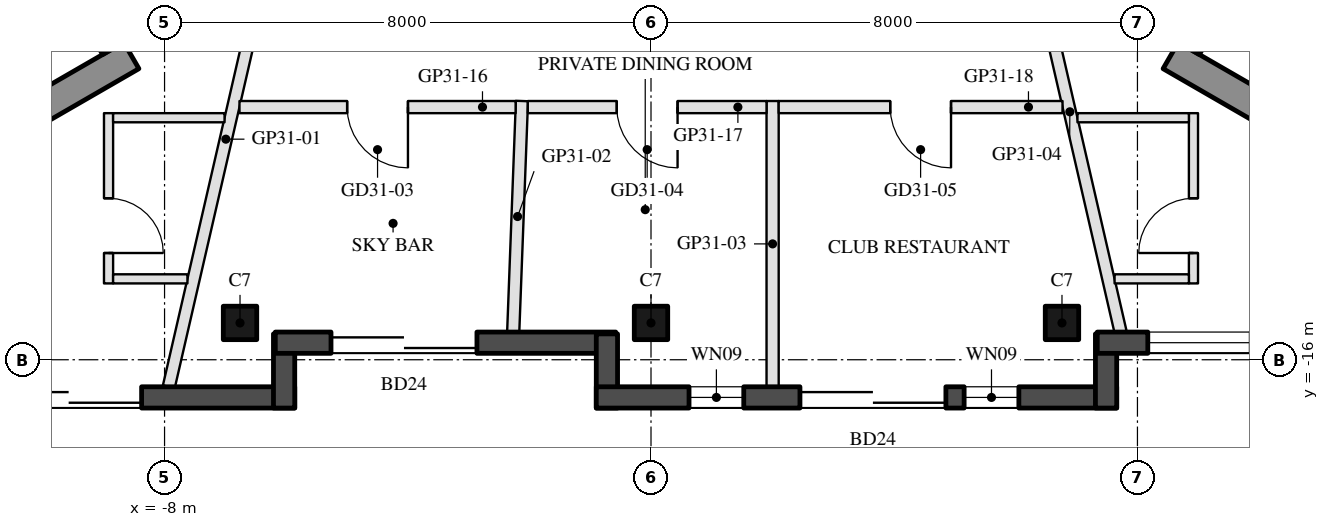
"""IFC4 building model, lengths in metres.
Left out: names, types, materials, properties, quantities, classifications, styles, units other than length and angle.
Written with IfcOpenShell. Run it as: python <this file> out.ifc"""

import sys

from ifc_helpers import new_model, si_unit, direction, frame, frame_2d, origin, origin_2d, place, context, subcontext, project, spatial, rectangle, hollow_rectangle, extrude, boolean, halfspace, element, fill, save


model = new_model("IFC4")
c1 = context("Model", 3, precision=1e-05, world=origin(), true_north=direction((0.0, 1.0)))
c2 = subcontext(c1, "Body", "Model", "MODEL_VIEW")
j1 = project(units=[si_unit("LENGTHUNIT", "METRE"), si_unit("PLANEANGLEUNIT", "RADIAN")], contexts=[c1])
p1 = place(None, origin())
s1 = spatial("IfcSite", under=j1, at=p1, CompositionType="ELEMENT")
p2 = place(p1, origin())
s2 = spatial("IfcBuilding", under=s1, at=p2, CompositionType="ELEMENT")
p3 = place(p2, frame((0.0, 0.0, 302.2)))
s3 = spatial("IfcBuildingStorey", under=s2, at=p3, CompositionType="ELEMENT", Elevation=302.2)
p4 = place(p3, frame((-6.759, -15.395, 0.0), z_axis=(0.0, 0.0, 1.0), x_axis=(-1.0, 0.0, 0.0)))
e1 = element("IfcColumn", 1, at=p4, inside=s3, PredefinedType="COLUMN", context=c2, shape_type="SweptSolid", body=[
    boolean("DIFFERENCE", extrude(hollow_rectangle(XDim=0.55, YDim=0.55, WallThickness=0.025, at=origin_2d()), origin(), (0.0, 0.0, 1.0), 3.7), halfspace(frame((0.0, 0.0, 0.034), z_axis=(0.0, 0.0, 1.0), x_axis=(1.0, 0.0, 0.0)), True)),
])
p5 = place(p3, frame((0.0, -15.395, 0.0), z_axis=(0.0, 0.0, 1.0), x_axis=(-1.0, 0.0, 0.0)))
e2 = element("IfcColumn", 2, at=p5, inside=s3, PredefinedType="COLUMN", context=c2, shape_type="SweptSolid", body=[
    boolean("DIFFERENCE", extrude(hollow_rectangle(XDim=0.55, YDim=0.55, WallThickness=0.025, at=origin_2d()), origin(), (0.0, 0.0, 1.0), 3.7), halfspace(frame((0.0, 0.0, 0.031), z_axis=(0.0, 0.0, 1.0), x_axis=(1.0, 0.0, 0.0)), True)),
])
p6 = place(p3, frame((6.759, -15.395, 0.0), z_axis=(0.0, 0.0, 1.0), x_axis=(-1.0, 0.0, 0.0)))
e3 = element("IfcColumn", 3, at=p6, inside=s3, PredefinedType="COLUMN", context=c2, shape_type="SweptSolid", body=[
    boolean("DIFFERENCE", extrude(hollow_rectangle(XDim=0.55, YDim=0.55, WallThickness=0.025, at=origin_2d()), origin(), (0.0, 0.0, 1.0), 3.7), halfspace(frame((0.0, 0.0, 0.034), z_axis=(0.0, 0.0, 1.0), x_axis=(1.0, 0.0, 0.0)), True)),
])
p7 = place(p3, frame((-16.098, -16.62, 0.0), z_axis=(0.0, 0.0, 1.0), x_axis=(1.0, 0.0, 0.0)))
e4 = element("IfcWall", 4, at=p7, inside=s3, PredefinedType="SOLIDWALL", context=c2, shape_type="SweptSolid", body=[
    extrude(rectangle(XDim=10.239, YDim=0.35, at=frame_2d((5.12, 0.0))), origin(), (0.0, 0.0, 1.0), 3.55),
])
p8 = place(p7, frame((0.381, 0.0, 0.3)))
e5 = element("IfcOpeningElement", 5, at=p8, cuts=e4, PredefinedType="OPENING", context=c2, shape_type="SweptSolid", body=[
    extrude(rectangle(XDim=1.5, YDim=2.65, at=frame_2d((0.75, 1.325))), frame((0.0, 0.185, 0.0), z_axis=(0.0, -1.0, 0.0), x_axis=(1.0, 0.0, 0.0)), (0.0, 0.0, 1.0), 0.37),
])
p9 = place(p7, frame((5.321, 0.0, 0.0)))
e6 = element("IfcOpeningElement", 6, at=p9, cuts=e4, PredefinedType="OPENING", context=c2, shape_type="SweptSolid", body=[
    extrude(rectangle(XDim=2.4, YDim=2.4, at=frame_2d((1.2, 1.2))), frame((0.0, 0.185, 0.0), z_axis=(0.0, -1.0, 0.0), x_axis=(1.0, 0.0, 0.0)), (0.0, 0.0, 1.0), 0.37),
])
p10 = place(p7, frame((3.205, 0.0, 0.3)))
e7 = element("IfcOpeningElement", 7, at=p10, cuts=e4, PredefinedType="OPENING", context=c2, shape_type="SweptSolid", body=[
    extrude(rectangle(XDim=1.8, YDim=2.65, at=frame_2d((0.9, 1.325))), frame((0.0, 0.185, 0.0), z_axis=(0.0, -1.0, 0.0), x_axis=(1.0, 0.0, 0.0)), (0.0, 0.0, 1.0), 0.37),
])
p11 = place(p3, frame((-6.034, -16.795, 0.0), z_axis=(0.0, 0.0, 1.0), x_axis=(0.0, 1.0, 0.0)))
e8 = element("IfcWall", 8, at=p11, inside=s3, PredefinedType="SOLIDWALL", context=c2, shape_type="SweptSolid", body=[
    extrude(rectangle(XDim=1.22, YDim=0.35, at=frame_2d((0.61, 0.0))), origin(), (0.0, 0.0, 1.0), 3.55),
])
p12 = place(p3, frame((-6.179, -15.719, 0.0), z_axis=(0.0, 0.0, 1.0), x_axis=(1.0, 0.0, 0.0)))
e9 = element("IfcWall", 9, at=p12, inside=s3, PredefinedType="SOLIDWALL", context=c2, shape_type="SweptSolid", body=[
    extrude(rectangle(XDim=5.599, YDim=0.35, at=frame_2d((2.799, 0.0))), origin(), (0.0, 0.0, 1.0), 3.55),
])
p13 = place(p12, frame((0.916, 0.0, 0.0)))
e10 = element("IfcOpeningElement", 10, at=p13, cuts=e9, PredefinedType="OPENING", context=c2, shape_type="SweptSolid", body=[
    extrude(rectangle(XDim=2.4, YDim=2.4, at=frame_2d((1.2, 1.2))), frame((0.0, 0.185, 0.0), z_axis=(0.0, -1.0, 0.0), x_axis=(1.0, 0.0, 0.0)), (0.0, 0.0, 1.0), 0.37),
])
p14 = place(p3, frame((-0.725, -15.575, 0.0), z_axis=(0.0, 0.0, 1.0), x_axis=(0.0, -1.0, 0.0)))
e11 = element("IfcWall", 11, at=p14, inside=s3, PredefinedType="SOLIDWALL", context=c2, shape_type="SweptSolid", body=[
    extrude(rectangle(XDim=1.22, YDim=0.35, at=frame_2d((0.61, 0.0))), origin(), (0.0, 0.0, 1.0), 3.55),
])
p15 = place(p3, frame((-0.9, -16.62, 0.0), z_axis=(0.0, 0.0, 1.0), x_axis=(1.0, 0.0, 0.0)))
e12 = element("IfcWall", 12, at=p15, inside=s3, PredefinedType="SOLIDWALL", context=c2, shape_type="SweptSolid", body=[
    extrude(rectangle(XDim=8.559, YDim=0.35, at=frame_2d((4.279, 0.0))), origin(), (0.0, 0.0, 1.0), 3.55),
])
p16 = place(p15, frame((1.525, 0.0, 0.3)))
e13 = element("IfcOpeningElement", 13, at=p16, cuts=e12, PredefinedType="OPENING", context=c2, shape_type="SweptSolid", body=[
    extrude(rectangle(XDim=0.9, YDim=2.65, at=frame_2d((0.45, 1.325))), frame((0.0, 0.185, 0.0), z_axis=(0.0, -1.0, 0.0), x_axis=(1.0, 0.0, 0.0)), (0.0, 0.0, 1.0), 0.37),
])
p17 = place(p15, frame((3.35, 0.0, 0.0)))
e14 = element("IfcOpeningElement", 14, at=p17, cuts=e12, PredefinedType="OPENING", context=c2, shape_type="SweptSolid", body=[
    extrude(rectangle(XDim=2.4, YDim=2.4, at=frame_2d((1.2, 1.2))), frame((0.0, 0.185, 0.0), z_axis=(0.0, -1.0, 0.0), x_axis=(1.0, 0.0, 0.0)), (0.0, 0.0, 1.0), 0.37),
])
p18 = place(p15, frame((6.05, 0.0, 0.3)))
e15 = element("IfcOpeningElement", 15, at=p18, cuts=e12, PredefinedType="OPENING", context=c2, shape_type="SweptSolid", body=[
    extrude(rectangle(XDim=0.9, YDim=2.65, at=frame_2d((0.45, 1.325))), frame((0.0, 0.185, 0.0), z_axis=(0.0, -1.0, 0.0), x_axis=(1.0, 0.0, 0.0)), (0.0, 0.0, 1.0), 0.37),
])
p19 = place(p3, frame((7.484, -16.795, 0.0), z_axis=(0.0, 0.0, 1.0), x_axis=(0.0, 1.0, 0.0)))
e16 = element("IfcWall", 16, at=p19, inside=s3, PredefinedType="SOLIDWALL", context=c2, shape_type="SweptSolid", body=[
    extrude(rectangle(XDim=1.22, YDim=0.35, at=frame_2d((0.61, 0.0))), origin(), (0.0, 0.0, 1.0), 3.55),
])
p20 = place(p3, frame((7.339, -15.719, 0.0), z_axis=(0.0, 0.0, 1.0), x_axis=(1.0, 0.0, 0.0)))
e17 = element("IfcWall", 17, at=p20, inside=s3, PredefinedType="SOLIDWALL", context=c2, shape_type="SweptSolid", body=[
    extrude(rectangle(XDim=5.599, YDim=0.35, at=frame_2d((2.799, 0.0))), origin(), (0.0, 0.0, 1.0), 3.55),
])
p21 = place(p20, frame((2.879, 0.0, 0.0)))
e18 = element("IfcOpeningElement", 18, at=p21, cuts=e17, PredefinedType="OPENING", context=c2, shape_type="SweptSolid", body=[
    extrude(rectangle(XDim=2.4, YDim=2.4, at=frame_2d((1.2, 1.2))), frame((0.0, 0.185, 0.0), z_axis=(0.0, -1.0, 0.0), x_axis=(1.0, 0.0, 0.0)), (0.0, 0.0, 1.0), 0.37),
])
p22 = place(p20, frame((0.831, 0.0, 0.3)))
e19 = element("IfcOpeningElement", 19, at=p22, cuts=e17, PredefinedType="OPENING", context=c2, shape_type="SweptSolid", body=[
    extrude(rectangle(XDim=1.7, YDim=2.65, at=frame_2d((0.85, 1.325))), frame((0.0, 0.185, 0.0), z_axis=(0.0, -1.0, 0.0), x_axis=(1.0, 0.0, 0.0)), (0.0, 0.0, 1.0), 0.37),
])
p23 = place(p3, frame((-8.547, -10.997, 0.0), z_axis=(0.0, 0.0, 1.0), x_axis=(-0.866027279078, -0.499996751883, 0.0)))
e20 = element("IfcWall", 20, at=p23, inside=s3, PredefinedType="SHEAR", context=c2, shape_type="SweptSolid", body=[
    extrude(rectangle(XDim=10.298, YDim=0.5, at=frame_2d((5.149, 0.0))), origin(), (0.0, 0.0, 1.0), 3.5),
])
p24 = place(p3, frame((-13.845, -2.22, 0.0), z_axis=(0.0, 0.0, 1.0), x_axis=(0.500004234368, -0.866022959057, 0.0)))
e21 = element("IfcWall", 21, at=p24, inside=s3, PredefinedType="SHEAR", context=c2, shape_type="SweptSolid", body=[
    extrude(rectangle(XDim=10.0, YDim=0.4, at=frame_2d((5.0, 0.0))), origin(), (0.0, 0.0, 1.0), 3.5),
])
p25 = place(p24, frame((3.55, 0.0, 0.0)))
e22 = element("IfcOpeningElement", 22, at=p25, cuts=e21, PredefinedType="OPENING", context=c2, shape_type="SweptSolid", body=[
    extrude(rectangle(XDim=1.1, YDim=2.1, at=frame_2d((0.55, 1.05))), frame((0.0, 0.21, 0.0), z_axis=(0.0, -1.0, 0.0), x_axis=(1.0, 0.0, 0.0)), (0.0, 0.0, 1.0), 0.42),
])
p26 = place(p24, frame((5.85, 0.0, 0.0)))
e23 = element("IfcOpeningElement", 23, at=p26, cuts=e21, PredefinedType="OPENING", context=c2, shape_type="SweptSolid", body=[
    extrude(rectangle(XDim=1.4, YDim=2.1, at=frame_2d((0.7, 1.05))), frame((0.0, 0.21, 0.0), z_axis=(0.0, -1.0, 0.0), x_axis=(1.0, 0.0, 0.0)), (0.0, 0.0, 1.0), 0.42),
])
p27 = place(p3, frame((8.547, -10.997, 0.0), z_axis=(0.0, 0.0, 1.0), x_axis=(0.866027279078, -0.499996751883, 0.0)))
e24 = element("IfcWall", 24, at=p27, inside=s3, PredefinedType="SHEAR", context=c2, shape_type="SweptSolid", body=[
    extrude(rectangle(XDim=10.298, YDim=0.5, at=frame_2d((5.149, 0.0))), origin(), (0.0, 0.0, 1.0), 3.5),
])
p28 = place(p3, frame((8.845, -10.88, 0.0), z_axis=(0.0, 0.0, 1.0), x_axis=(0.500004234368, 0.866022959057, 0.0)))
e25 = element("IfcWall", 25, at=p28, inside=s3, PredefinedType="SHEAR", context=c2, shape_type="SweptSolid", body=[
    extrude(rectangle(XDim=10.0, YDim=0.4, at=frame_2d((5.0, 0.0))), origin(), (0.0, 0.0, 1.0), 3.5),
])
p29 = place(p28, frame((3.55, 0.0, 0.0)))
e26 = element("IfcOpeningElement", 26, at=p29, cuts=e25, PredefinedType="OPENING", context=c2, shape_type="SweptSolid", body=[
    extrude(rectangle(XDim=1.1, YDim=2.1, at=frame_2d((0.55, 1.05))), frame((0.0, 0.21, 0.0), z_axis=(0.0, -1.0, 0.0), x_axis=(1.0, 0.0, 0.0)), (0.0, 0.0, 1.0), 0.42),
])
p30 = place(p28, frame((5.85, 0.0, 0.0)))
e27 = element("IfcOpeningElement", 27, at=p30, cuts=e25, PredefinedType="OPENING", context=c2, shape_type="SweptSolid", body=[
    extrude(rectangle(XDim=1.4, YDim=2.1, at=frame_2d((0.7, 1.05))), frame((0.0, 0.21, 0.0), z_axis=(0.0, -1.0, 0.0), x_axis=(1.0, 0.0, 0.0)), (0.0, 0.0, 1.0), 0.42),
])
p31 = place(p3, frame((-7.93, -16.445, 0.0), z_axis=(0.0, 0.0, 1.0), x_axis=(0.224458408835, 0.974483669798, 0.0)))
e28 = element("IfcWall", 28, at=p31, inside=s3, PredefinedType="PARTITIONING", context=c2, shape_type="SweptSolid", body=[
    extrude(rectangle(XDim=8.358, YDim=0.2, at=frame_2d((4.179, 0.0))), origin(), (0.0, 0.0, 1.0), 3.1),
])
p32 = place(p3, frame((-2.266, -15.545, 0.0), z_axis=(0.0, 0.0, 1.0), x_axis=(0.037750136795, 0.999287209551, 0.0)))
e29 = element("IfcWall", 29, at=p32, inside=s3, PredefinedType="PARTITIONING", context=c2, shape_type="SweptSolid", body=[
    extrude(rectangle(XDim=3.803, YDim=0.2, at=frame_2d((1.901, 0.0))), origin(), (0.0, 0.0, 1.0), 3.16),
])
p33 = place(p3, frame((2.0, -16.445, 0.0), z_axis=(0.0, 0.0, 1.0), x_axis=(0.0, 1.0, 0.0)))
e30 = element("IfcWall", 30, at=p33, inside=s3, PredefinedType="PARTITIONING", context=c2, shape_type="SweptSolid", body=[
    extrude(rectangle(XDim=4.7, YDim=0.2, at=frame_2d((2.35, 0.0))), origin(), (0.0, 0.0, 1.0), 3.16),
])
p34 = place(p3, frame((7.723, -15.545, 0.0), z_axis=(0.0, 0.0, 1.0), x_axis=(-0.224458954761, 0.974483544052, 0.0)))
e31 = element("IfcWall", 31, at=p34, inside=s3, PredefinedType="PARTITIONING", context=c2, shape_type="SweptSolid", body=[
    extrude(rectangle(XDim=7.434, YDim=0.2, at=frame_2d((3.717, 0.0))), origin(), (0.0, 0.0, 1.0), 3.1),
])
p35 = place(p3, frame((-8.921, -11.945, 0.0), z_axis=(0.0, 0.0, 1.0), x_axis=(0.0, -1.0, 0.0)))
e32 = element("IfcWall", 32, at=p35, inside=s3, PredefinedType="PARTITIONING", context=c2, shape_type="SweptSolid", body=[
    extrude(rectangle(XDim=2.8, YDim=0.15, at=frame_2d((1.4, 0.0))), origin(), (0.0, 0.0, 1.0), 3.55),
])
p36 = place(p35, frame((1.4, 0.0, 0.0)))
e33 = element("IfcOpeningElement", 33, at=p36, cuts=e32, PredefinedType="OPENING", context=c2, shape_type="SweptSolid", body=[
    extrude(rectangle(XDim=0.9, YDim=2.1, at=frame_2d((0.45, 1.05))), frame((0.0, 0.085, 0.0), z_axis=(0.0, -1.0, 0.0), x_axis=(1.0, 0.0, 0.0)), (0.0, 0.0, 1.0), 0.17),
])
p37 = place(p3, frame((-8.846, -14.67, 0.0), z_axis=(0.0, 0.0, 1.0), x_axis=(1.0, 0.0, 0.0)))
e34 = element("IfcWall", 34, at=p37, inside=s3, PredefinedType="PARTITIONING", context=c2, shape_type="SweptSolid", body=[
    extrude(rectangle(XDim=1.222, YDim=0.15, at=frame_2d((0.611, 0.0))), origin(), (0.0, 0.0, 1.0), 3.55),
])
p38 = place(p3, frame((-8.846, -12.02, 0.0), z_axis=(0.0, 0.0, 1.0), x_axis=(1.0, 0.0, 0.0)))
e35 = element("IfcWall", 35, at=p38, inside=s3, PredefinedType="PARTITIONING", context=c2, shape_type="SweptSolid", body=[
    extrude(rectangle(XDim=1.833, YDim=0.15, at=frame_2d((0.917, 0.0))), origin(), (0.0, 0.0, 1.0), 3.55),
])
p39 = place(p3, frame((-2.226, -11.844, 0.0), z_axis=(0.0, 0.0, 1.0), x_axis=(-1.0, 0.0, 0.0)))
e36 = element("IfcWall", 36, at=p39, inside=s3, PredefinedType="PARTITIONING", context=c2, shape_type="SweptSolid", body=[
    extrude(rectangle(XDim=4.542, YDim=0.2, at=frame_2d((2.271, 0.0))), origin(), (0.0, 0.0, 1.0), 3.1),
])
p40 = place(p39, frame((1.771, 0.0, 0.0)))
e37 = element("IfcOpeningElement", 37, at=p40, cuts=e36, PredefinedType="OPENING", context=c2, shape_type="SweptSolid", body=[
    extrude(rectangle(XDim=1.0, YDim=2.1, at=frame_2d((0.5, 1.05))), frame((0.0, 0.11, 0.0), z_axis=(0.0, -1.0, 0.0), x_axis=(1.0, 0.0, 0.0)), (0.0, 0.0, 1.0), 0.22),
])
p41 = place(p3, frame((1.9, -11.844, 0.0), z_axis=(0.0, 0.0, 1.0), x_axis=(-1.0, 0.0, 0.0)))
e38 = element("IfcWall", 38, at=p41, inside=s3, PredefinedType="PARTITIONING", context=c2, shape_type="SweptSolid", body=[
    extrude(rectangle(XDim=3.926, YDim=0.2, at=frame_2d((1.963, 0.0))), origin(), (0.0, 0.0, 1.0), 3.1),
])
p42 = place(p41, frame((1.463, 0.0, 0.0)))
e39 = element("IfcOpeningElement", 39, at=p42, cuts=e38, PredefinedType="OPENING", context=c2, shape_type="SweptSolid", body=[
    extrude(rectangle(XDim=1.0, YDim=2.1, at=frame_2d((0.5, 1.05))), frame((0.0, 0.11, 0.0), z_axis=(0.0, -1.0, 0.0), x_axis=(1.0, 0.0, 0.0)), (0.0, 0.0, 1.0), 0.22),
])
p43 = place(p3, frame((6.768, -11.844, 0.0), z_axis=(0.0, 0.0, 1.0), x_axis=(-1.0, 0.0, 0.0)))
e40 = element("IfcWall", 40, at=p43, inside=s3, PredefinedType="PARTITIONING", context=c2, shape_type="SweptSolid", body=[
    extrude(rectangle(XDim=4.668, YDim=0.2, at=frame_2d((2.334, 0.0))), origin(), (0.0, 0.0, 1.0), 3.1),
])
p44 = place(p43, frame((1.834, 0.0, 0.0)))
e41 = element("IfcOpeningElement", 41, at=p44, cuts=e40, PredefinedType="OPENING", context=c2, shape_type="SweptSolid", body=[
    extrude(rectangle(XDim=1.0, YDim=2.1, at=frame_2d((0.5, 1.05))), frame((0.0, 0.11, 0.0), z_axis=(0.0, -1.0, 0.0), x_axis=(1.0, 0.0, 0.0)), (0.0, 0.0, 1.0), 0.22),
])
p45 = place(p3, frame((8.921, -14.745, 0.0), z_axis=(0.0, 0.0, 1.0), x_axis=(0.0, 1.0, 0.0)))
e42 = element("IfcWall", 42, at=p45, inside=s3, PredefinedType="PARTITIONING", context=c2, shape_type="SweptSolid", body=[
    extrude(rectangle(XDim=2.8, YDim=0.15, at=frame_2d((1.4, 0.0))), origin(), (0.0, 0.0, 1.0), 3.55),
])
p46 = place(p45, frame((0.5, 0.0, 0.0)))
e43 = element("IfcOpeningElement", 43, at=p46, cuts=e42, PredefinedType="OPENING", context=c2, shape_type="SweptSolid", body=[
    extrude(rectangle(XDim=0.9, YDim=2.1, at=frame_2d((0.45, 1.05))), frame((0.0, 0.085, 0.0), z_axis=(0.0, -1.0, 0.0), x_axis=(1.0, 0.0, 0.0)), (0.0, 0.0, 1.0), 0.17),
])
p47 = place(p3, frame((7.624, -14.67, 0.0), z_axis=(0.0, 0.0, 1.0), x_axis=(1.0, 0.0, 0.0)))
e44 = element("IfcWall", 44, at=p47, inside=s3, PredefinedType="PARTITIONING", context=c2, shape_type="SweptSolid", body=[
    extrude(rectangle(XDim=1.222, YDim=0.15, at=frame_2d((0.611, 0.0))), origin(), (0.0, 0.0, 1.0), 3.55),
])
p48 = place(p3, frame((7.013, -12.02, 0.0), z_axis=(0.0, 0.0, 1.0), x_axis=(1.0, 0.0, 0.0)))
e45 = element("IfcWall", 45, at=p48, inside=s3, PredefinedType="PARTITIONING", context=c2, shape_type="SweptSolid", body=[
    extrude(rectangle(XDim=1.833, YDim=0.15, at=frame_2d((0.917, 0.0))), origin(), (0.0, 0.0, 1.0), 3.55),
])
p49 = place(p9, frame((2.4, 0.0, 0.0), z_axis=(0.0, 0.0, 1.0), x_axis=(-1.0, 0.0, 0.0)))
e46 = element("IfcDoor", 46, at=p49, inside=s3, OperationType="SLIDING_TO_LEFT", PredefinedType="DOOR", context=c2, shape_type="SweptSolid", body=[
    extrude(rectangle(XDim=2.4, YDim=2.4, at=frame_2d((1.2, 1.2))), frame((0.0, 0.025, 0.0), z_axis=(0.0, -1.0, 0.0), x_axis=(1.0, 0.0, 0.0)), (0.0, 0.0, 1.0), 0.05),
])
fill(e6, e46)
p50 = place(p13, frame((2.4, 0.0, 0.0), z_axis=(0.0, 0.0, 1.0), x_axis=(-1.0, 0.0, 0.0)))
e47 = element("IfcDoor", 47, at=p50, inside=s3, OperationType="SLIDING_TO_LEFT", PredefinedType="DOOR", context=c2, shape_type="SweptSolid", body=[
    extrude(rectangle(XDim=2.4, YDim=2.4, at=frame_2d((1.2, 1.2))), frame((0.0, 0.025, 0.0), z_axis=(0.0, -1.0, 0.0), x_axis=(1.0, 0.0, 0.0)), (0.0, 0.0, 1.0), 0.05),
])
fill(e10, e47)
p51 = place(p16, origin())
e48 = element("IfcWindow", 48, at=p51, inside=s3, PartitioningType="SINGLE_PANEL", PredefinedType="WINDOW", context=c2, shape_type="SweptSolid", body=[
    extrude(rectangle(XDim=0.9, YDim=2.65, at=frame_2d((0.45, 1.325))), frame((0.0, 0.03, 0.0), z_axis=(0.0, -1.0, 0.0), x_axis=(1.0, 0.0, 0.0)), (0.0, 0.0, 1.0), 0.06),
])
fill(e13, e48)
p52 = place(p17, frame((2.4, 0.0, 0.0), z_axis=(0.0, 0.0, 1.0), x_axis=(-1.0, 0.0, 0.0)))
e49 = element("IfcDoor", 49, at=p52, inside=s3, OperationType="SLIDING_TO_LEFT", PredefinedType="DOOR", context=c2, shape_type="SweptSolid", body=[
    extrude(rectangle(XDim=2.4, YDim=2.4, at=frame_2d((1.2, 1.2))), frame((0.0, 0.025, 0.0), z_axis=(0.0, -1.0, 0.0), x_axis=(1.0, 0.0, 0.0)), (0.0, 0.0, 1.0), 0.05),
])
fill(e14, e49)
p53 = place(p18, origin())
e50 = element("IfcWindow", 50, at=p53, inside=s3, PartitioningType="SINGLE_PANEL", PredefinedType="WINDOW", context=c2, shape_type="SweptSolid", body=[
    extrude(rectangle(XDim=0.9, YDim=2.65, at=frame_2d((0.45, 1.325))), frame((0.0, 0.03, 0.0), z_axis=(0.0, -1.0, 0.0), x_axis=(1.0, 0.0, 0.0)), (0.0, 0.0, 1.0), 0.06),
])
fill(e15, e50)
p54 = place(p22, origin())
e51 = element("IfcWindow", 51, at=p54, inside=s3, PartitioningType="SINGLE_PANEL", PredefinedType="WINDOW", context=c2, shape_type="SweptSolid", body=[
    extrude(rectangle(XDim=1.7, YDim=2.65, at=frame_2d((0.85, 1.325))), frame((0.0, 0.03, 0.0), z_axis=(0.0, -1.0, 0.0), x_axis=(1.0, 0.0, 0.0)), (0.0, 0.0, 1.0), 0.06),
])
fill(e19, e51)
p55 = place(p36, origin())
e52 = element("IfcDoor", 52, at=p55, inside=s3, OperationType="SINGLE_SWING_RIGHT", PredefinedType="DOOR", context=c2, shape_type="SweptSolid", body=[
    extrude(rectangle(XDim=0.9, YDim=2.1, at=frame_2d((0.45, 1.05))), frame((0.0, 0.025, 0.0), z_axis=(0.0, -1.0, 0.0), x_axis=(1.0, 0.0, 0.0)), (0.0, 0.0, 1.0), 0.05),
])
fill(e33, e52)
p56 = place(p40, origin())
e53 = element("IfcDoor", 53, at=p56, inside=s3, OperationType="SINGLE_SWING_LEFT", PredefinedType="DOOR", context=c2, shape_type="SweptSolid", body=[
    extrude(rectangle(XDim=1.0, YDim=2.1, at=frame_2d((0.5, 1.05))), frame((0.0, 0.025, 0.0), z_axis=(0.0, -1.0, 0.0), x_axis=(1.0, 0.0, 0.0)), (0.0, 0.0, 1.0), 0.05),
])
fill(e37, e53)
p57 = place(p42, origin())
e54 = element("IfcDoor", 54, at=p57, inside=s3, OperationType="SINGLE_SWING_LEFT", PredefinedType="DOOR", context=c2, shape_type="SweptSolid", body=[
    extrude(rectangle(XDim=1.0, YDim=2.1, at=frame_2d((0.5, 1.05))), frame((0.0, 0.025, 0.0), z_axis=(0.0, -1.0, 0.0), x_axis=(1.0, 0.0, 0.0)), (0.0, 0.0, 1.0), 0.05),
])
fill(e39, e54)
p58 = place(p44, origin())
e55 = element("IfcDoor", 55, at=p58, inside=s3, OperationType="SINGLE_SWING_LEFT", PredefinedType="DOOR", context=c2, shape_type="SweptSolid", body=[
    extrude(rectangle(XDim=1.0, YDim=2.1, at=frame_2d((0.5, 1.05))), frame((0.0, 0.025, 0.0), z_axis=(0.0, -1.0, 0.0), x_axis=(1.0, 0.0, 0.0)), (0.0, 0.0, 1.0), 0.05),
])
fill(e41, e55)
p59 = place(p46, origin())
e56 = element("IfcDoor", 56, at=p59, inside=s3, OperationType="SINGLE_SWING_LEFT", PredefinedType="DOOR", context=c2, shape_type="SweptSolid", body=[
    extrude(rectangle(XDim=0.9, YDim=2.1, at=frame_2d((0.45, 1.05))), frame((0.0, 0.025, 0.0), z_axis=(0.0, -1.0, 0.0), x_axis=(1.0, 0.0, 0.0)), (0.0, 0.0, 1.0), 0.05),
])
fill(e43, e56)
save(model, sys.argv[1])
